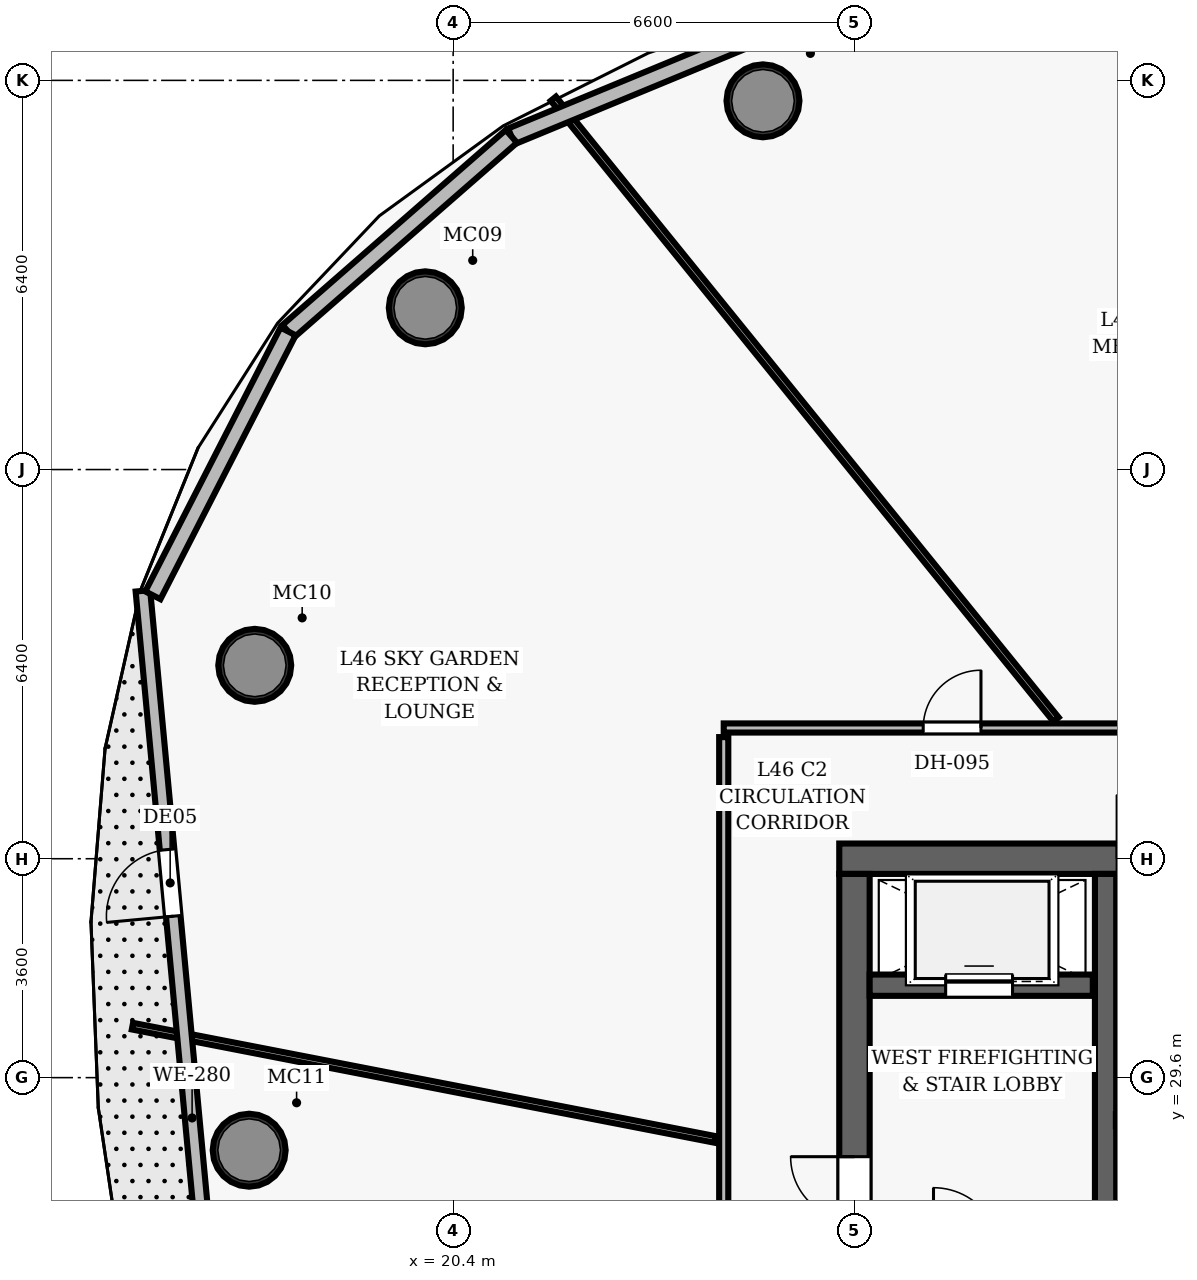
"""IFC4 building model, lengths in metres.
Left out: names, types, materials, properties, quantities, classifications, styles, units other than length and angle.
Written with IfcOpenShell. Run it as: python <this file> out.ifc"""

import sys

from ifc_helpers import new_model, si_unit, direction, frame, frame_2d, origin, origin_2d, place, context, subcontext, project, spatial, rectangle, hollow_circle, extrude, element, fill, save


model = new_model("IFC4")
c1 = context("Model", 3, precision=1e-05, world=origin(), true_north=direction((0.0, 1.0)))
c2 = subcontext(c1, "Body", "Model", "MODEL_VIEW")
j1 = project(units=[si_unit("LENGTHUNIT", "METRE"), si_unit("PLANEANGLEUNIT", "RADIAN")], contexts=[c1])
p1 = place(None, origin())
s1 = spatial("IfcSite", under=j1, at=p1, CompositionType="ELEMENT")
p2 = place(p1, origin())
s2 = spatial("IfcBuilding", under=s1, at=p2, CompositionType="ELEMENT")
p3 = place(p2, frame((0.0, 0.0, 182.75)))
s3 = spatial("IfcBuildingStorey", under=s2, at=p3, CompositionType="ELEMENT", Elevation=182.75)
p4 = place(p3, frame((26.75, 33.2, 0.0), z_axis=(0.0, 0.0, 1.0), x_axis=(1.0, 0.0, 0.0)))
e1 = element("IfcWall", 1, at=p4, inside=s3, PredefinedType="SHEAR", context=c2, shape_type="SweptSolid", body=[
    extrude(rectangle(XDim=22.5, YDim=0.5, at=frame_2d((11.25, 0.0))), origin(), (0.0, 0.0, 1.0), 3.85),
])
p5 = place(p4, frame((4.57, 0.0, 0.0)))
e2 = element("IfcOpeningElement", 2, at=p5, cuts=e1, PredefinedType="OPENING", context=c2, shape_type="SweptSolid", body=[
    extrude(rectangle(XDim=1.05, YDim=2.15, at=frame_2d((0.525, 1.075))), frame((0.0, 0.26, 0.0), z_axis=(0.0, -1.0, 0.0), x_axis=(1.0, 0.0, 0.0)), (0.0, 0.0, 1.0), 0.52),
])
p6 = place(p4, frame((14.47, 0.0, 0.0)))
e3 = element("IfcOpeningElement", 3, at=p6, cuts=e1, PredefinedType="OPENING", context=c2, shape_type="SweptSolid", body=[
    extrude(rectangle(XDim=1.05, YDim=2.15, at=frame_2d((0.525, 1.075))), frame((0.0, 0.26, 0.0), z_axis=(0.0, -1.0, 0.0), x_axis=(1.0, 0.0, 0.0)), (0.0, 0.0, 1.0), 0.52),
])
p7 = place(p3, frame((27.0, 19.05, 0.0), z_axis=(0.0, 0.0, 1.0), x_axis=(0.0, 1.0, 0.0)))
e4 = element("IfcWall", 4, at=p7, inside=s3, PredefinedType="SHEAR", context=c2, shape_type="SweptSolid", body=[
    extrude(rectangle(XDim=13.9, YDim=0.5, at=frame_2d((6.95, 0.0))), origin(), (0.0, 0.0, 1.0), 3.85),
])
p8 = place(p7, frame((8.2, 0.0, 0.0)))
e5 = element("IfcOpeningElement", 5, at=p8, cuts=e4, PredefinedType="OPENING", context=c2, shape_type="SweptSolid", body=[
    extrude(rectangle(XDim=1.05, YDim=2.15, at=frame_2d((0.525, 1.075))), frame((0.0, 0.26, 0.0), z_axis=(0.0, -1.0, 0.0), x_axis=(1.0, 0.0, 0.0)), (0.0, 0.0, 1.0), 0.52),
])
p9 = place(p3, frame((31.13, 19.05, 0.0), z_axis=(0.0, 0.0, 1.0), x_axis=(0.0, 1.0, 0.0)))
e6 = element("IfcWall", 6, at=p9, inside=s3, PredefinedType="SHEAR", context=c2, shape_type="SweptSolid", body=[
    extrude(rectangle(XDim=13.9, YDim=0.35, at=frame_2d((6.95, 0.0))), origin(), (0.0, 0.0, 1.0), 3.85),
])
for number, where, z_axis, x_axis in (
    (7, (25.496, 45.664, 0.0), (0.0, 0.0, 1.0), (1.0, 0.0, 0.0)),
    (8, (19.942, 42.26, 0.0), (0.0, 0.0, 1.0), (1.0, 0.0, 0.0)),
    (9, (17.137, 36.381, 0.0), (0.0, 0.0, 1.0), (1.0, 0.0, 0.0)),
    (10, (17.045, 28.406, 0.0), (0.0, 0.0, 1.0), (1.0, 0.0, 0.0)),
):
    element("IfcColumn", number, at=place(p3, frame(where, z_axis=z_axis, x_axis=x_axis)), inside=s3, PredefinedType="COLUMN", context=c2, shape_type="SweptSolid", body=[
        extrude(hollow_circle(Radius=0.6, WallThickness=0.05, at=origin_2d()), origin(), (0.0, 0.0, 1.0), 3.85),
    ])
p10 = place(p3, frame((27.25, 31.12, 0.0), z_axis=(0.0, 0.0, 1.0), x_axis=(1.0, 0.0, 0.0)))
e11 = element("IfcWall", 11, at=p10, inside=s3, PredefinedType="SHEAR", context=c2, shape_type="SweptSolid", body=[
    extrude(rectangle(XDim=3.67, YDim=0.35, at=frame_2d((1.835, 0.0))), origin(), (0.0, 0.0, 1.0), 3.035),
])
p11 = place(p10, frame((1.25, 0.0, 0.0)))
e12 = element("IfcOpeningElement", 12, at=p11, cuts=e11, PredefinedType="OPENING", context=c2, shape_type="SweptSolid", body=[
    extrude(rectangle(XDim=1.1, YDim=2.15, at=frame_2d((0.55, 1.075))), frame((0.0, 0.185, 0.0), z_axis=(0.0, -1.0, 0.0), x_axis=(1.0, 0.0, 0.0)), (0.0, 0.0, 1.0), 0.37),
])
p12 = place(p3, frame((31.3, 28.9, 0.0), z_axis=(0.0, 0.0, 1.0), x_axis=(1.0, 0.0, 0.0)))
e13 = element("IfcWall", 13, at=p12, inside=s3, PredefinedType="PARTITIONING", context=c2, shape_type="SweptSolid", body=[
    extrude(rectangle(XDim=1.12, YDim=0.2, at=frame_2d((0.56, 0.0))), origin(), (0.0, 0.0, 1.0), 3.035),
])
p13 = place(p3, frame((24.85, 35.35, 0.0), z_axis=(0.0, 0.0, 1.0), x_axis=(1.0, 0.0, 0.0)))
e14 = element("IfcWall", 14, at=p13, inside=s3, PredefinedType="PARTITIONING", context=c2, shape_type="SweptSolid", body=[
    extrude(rectangle(XDim=26.0, YDim=0.15, at=frame_2d((13.0, 0.0))), origin(), (0.0, 0.0, 1.0), 3.035),
])
p14 = place(p13, frame((14.715, 0.0, 0.0)))
e15 = element("IfcOpeningElement", 15, at=p14, cuts=e14, PredefinedType="OPENING", context=c2, shape_type="SweptSolid", body=[
    extrude(rectangle(XDim=0.95, YDim=2.15, at=frame_2d((0.475, 1.075))), frame((0.0, 0.085, 0.0), z_axis=(0.0, -1.0, 0.0), x_axis=(1.0, 0.0, 0.0)), (0.0, 0.0, 1.0), 0.17),
])
p15 = place(p13, frame((10.181, 0.0, 0.0)))
e16 = element("IfcOpeningElement", 16, at=p15, cuts=e14, PredefinedType="OPENING", context=c2, shape_type="SweptSolid", body=[
    extrude(rectangle(XDim=0.95, YDim=2.15, at=frame_2d((0.475, 1.075))), frame((0.0, 0.085, 0.0), z_axis=(0.0, -1.0, 0.0), x_axis=(1.0, 0.0, 0.0)), (0.0, 0.0, 1.0), 0.17),
])
p16 = place(p13, frame((3.281, 0.0, 0.0)))
e17 = element("IfcOpeningElement", 17, at=p16, cuts=e14, PredefinedType="OPENING", context=c2, shape_type="SweptSolid", body=[
    extrude(rectangle(XDim=0.95, YDim=2.15, at=frame_2d((0.475, 1.075))), frame((0.0, 0.085, 0.0), z_axis=(0.0, -1.0, 0.0), x_axis=(1.0, 0.0, 0.0)), (0.0, 0.0, 1.0), 0.17),
])
p17 = place(p3, frame((24.85, 27.08, 0.0), z_axis=(0.0, 0.0, 1.0), x_axis=(0.0, 1.0, 0.0)))
e18 = element("IfcWall", 18, at=p17, inside=s3, PredefinedType="PARTITIONING", context=c2, shape_type="SweptSolid", body=[
    extrude(rectangle(XDim=8.12, YDim=0.15, at=frame_2d((4.06, 0.0))), origin(), (0.0, 0.0, 1.0), 3.035),
])
p18 = place(p3, frame((30.315, 35.49, 0.0), z_axis=(0.0, 0.0, 1.0), x_axis=(-0.629312097209, 0.777152677603, 0.0)))
e19 = element("IfcWall", 19, at=p18, inside=s3, PredefinedType="PARTITIONING", context=c2, shape_type="SweptSolid", body=[
    extrude(rectangle(XDim=13.137, YDim=0.11, at=frame_2d((6.568, 0.0))), origin(), (0.0, 0.0, 1.0), 3.035),
])
p19 = place(p3, frame((24.71, 28.583, 0.0), z_axis=(0.0, 0.0, 1.0), x_axis=(-0.981627099971, 0.190809424827, 0.0)))
e20 = element("IfcWall", 20, at=p19, inside=s3, PredefinedType="PARTITIONING", context=c2, shape_type="SweptSolid", body=[
    extrude(rectangle(XDim=9.764, YDim=0.11, at=frame_2d((4.882, 0.0))), origin(), (0.0, 0.0, 1.0), 3.035),
])
p20 = place(p3, frame((16.393, 25.872, 0.0), z_axis=(0.0, 0.0, 1.0), x_axis=(-0.092960122744, 0.995669832615, 0.0)))
e21 = element("IfcWall", 21, at=p20, inside=s3, PredefinedType="SOLIDWALL", context=c2, shape_type="SweptSolid", body=[
    extrude(rectangle(XDim=11.784, YDim=0.24, at=frame_2d((5.892, 0.0))), origin(), (0.0, 0.0, 1.0), 2.8),
])
p21 = place(p20, frame((6.41, 0.0, 0.0)))
e22 = element("IfcOpeningElement", 22, at=p21, cuts=e21, PredefinedType="OPENING", context=c2, shape_type="SweptSolid", body=[
    extrude(rectangle(XDim=1.1, YDim=2.2, at=frame_2d((0.55, 1.1))), frame((0.0, 0.13, 0.0), z_axis=(0.0, -1.0, 0.0), x_axis=(1.0, 0.0, 0.0)), (0.0, 0.0, 1.0), 0.26),
])
p22 = place(p3, frame((21.358, 45.079, 0.0), z_axis=(0.0, 0.0, 1.0), x_axis=(0.924217553659, 0.38186635556, 0.0)))
e23 = element("IfcWall", 23, at=p22, inside=s3, PredefinedType="SOLIDWALL", context=c2, shape_type="SweptSolid", body=[
    extrude(rectangle(XDim=5.464, YDim=0.28, at=frame_2d((2.732, 0.0))), origin(), (0.0, 0.0, 1.0), 3.62),
])
p23 = place(p3, frame((17.685, 41.872, 0.0), z_axis=(0.0, 0.0, 1.0), x_axis=(0.753209053351, 0.657781211308, 0.0)))
e24 = element("IfcWall", 24, at=p23, inside=s3, PredefinedType="SOLIDWALL", context=c2, shape_type="SweptSolid", body=[
    extrude(rectangle(XDim=4.876, YDim=0.28, at=frame_2d((2.438, 0.0))), origin(), (0.0, 0.0, 1.0), 3.62),
])
p24 = place(p3, frame((15.461, 37.532, 0.0), z_axis=(0.0, 0.0, 1.0), x_axis=(0.456043209495, 0.889957634426, 0.0)))
e25 = element("IfcWall", 25, at=p24, inside=s3, PredefinedType="SOLIDWALL", context=c2, shape_type="SweptSolid", body=[
    extrude(rectangle(XDim=4.876, YDim=0.28, at=frame_2d((2.438, 0.0))), origin(), (0.0, 0.0, 1.0), 3.62),
])
p25 = place(p8, origin())
e26 = element("IfcDoor", 26, at=p25, inside=s3, OperationType="SINGLE_SWING_RIGHT", PredefinedType="DOOR", context=c2, shape_type="SweptSolid", body=[
    extrude(rectangle(XDim=1.05, YDim=2.15, at=frame_2d((0.525, 1.075))), frame((0.0, 0.025, 0.0), z_axis=(0.0, -1.0, 0.0), x_axis=(1.0, 0.0, 0.0)), (0.0, 0.0, 1.0), 0.05),
])
fill(e5, e26)
p26 = place(p16, origin())
e27 = element("IfcDoor", 27, at=p26, inside=s3, OperationType="SINGLE_SWING_RIGHT", PredefinedType="DOOR", context=c2, shape_type="SweptSolid", body=[
    extrude(rectangle(XDim=0.95, YDim=2.15, at=frame_2d((0.475, 1.075))), frame((0.0, 0.025, 0.0), z_axis=(0.0, -1.0, 0.0), x_axis=(1.0, 0.0, 0.0)), (0.0, 0.0, 1.0), 0.05),
])
fill(e17, e27)
p27 = place(p11, origin())
e28 = element("IfcDoor", 28, at=p27, inside=s3, OperationType="SLIDING_TO_LEFT", PredefinedType="DOOR", context=c2, shape_type="SweptSolid", body=[
    extrude(rectangle(XDim=1.1, YDim=2.15, at=frame_2d((0.55, 1.075))), frame((0.0, 0.025, 0.0), z_axis=(0.0, -1.0, 0.0), x_axis=(1.0, 0.0, 0.0)), (0.0, 0.0, 1.0), 0.05),
])
fill(e12, e28)
p28 = place(p21, origin())
e29 = element("IfcDoor", 29, at=p28, inside=s3, OperationType="SINGLE_SWING_LEFT", PredefinedType="DOOR", context=c2, shape_type="SweptSolid", body=[
    extrude(rectangle(XDim=1.1, YDim=2.2, at=frame_2d((0.55, 1.1))), frame((0.0, 0.025, 0.0), z_axis=(0.0, -1.0, 0.0), x_axis=(1.0, 0.0, 0.0)), (0.0, 0.0, 1.0), 0.05),
])
fill(e22, e29)
save(model, sys.argv[1])
